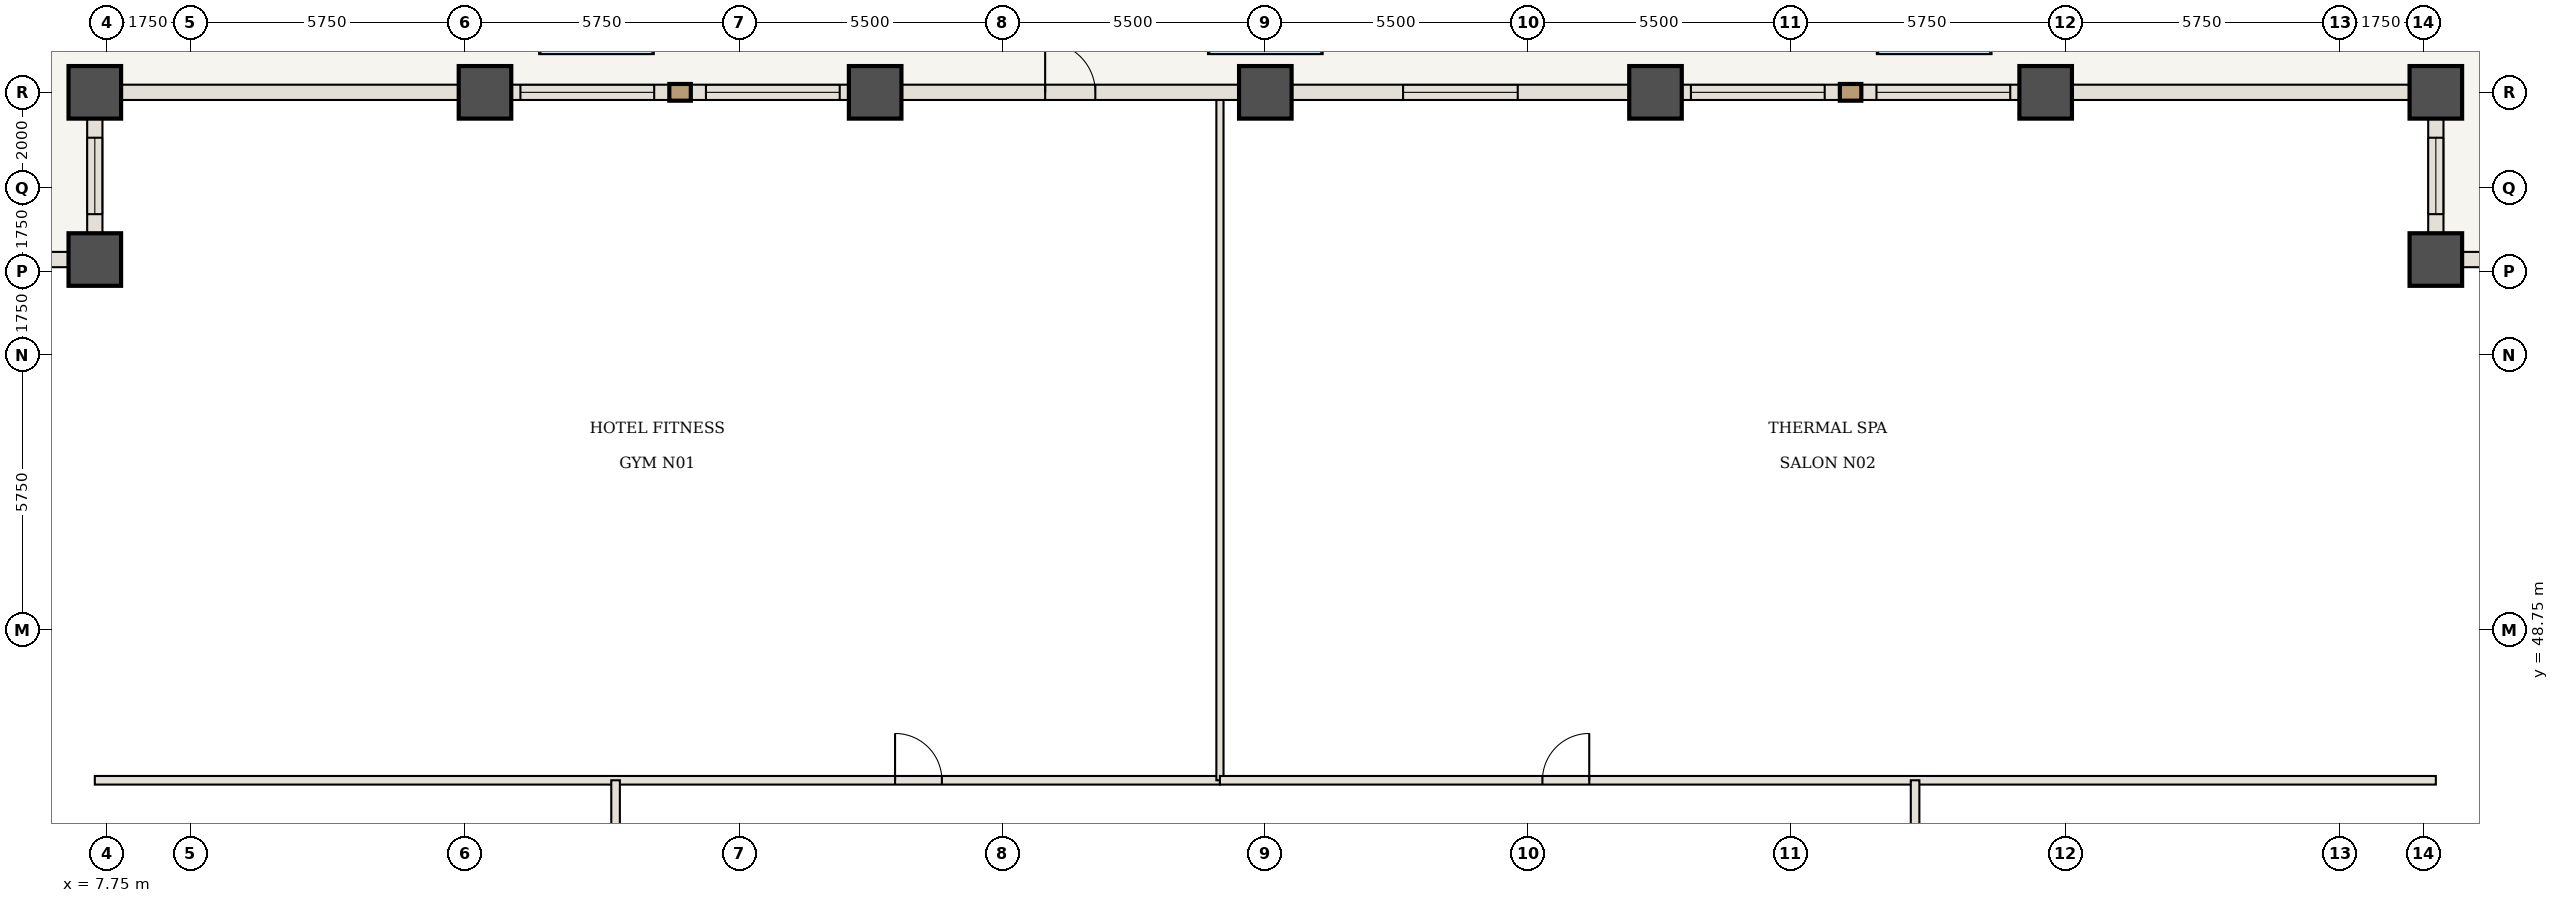
"""IFC4 building model, lengths in metres.
Left out: names, types, materials, properties, quantities, classifications, styles, units other than length and angle.
Written with IfcOpenShell. Run it as: python <this file> out.ifc"""

import sys

from ifc_helpers import new_model, si_unit, direction, frame, frame_2d, origin, origin_2d, place, context, subcontext, project, spatial, rectangle, extrude, element, fill, save


model = new_model("IFC4")
c1 = context("Model", 3, precision=1e-05, world=origin(), true_north=direction((0.0, 1.0)))
c2 = subcontext(c1, "Body", "Model", "MODEL_VIEW")
j1 = project(units=[si_unit("LENGTHUNIT", "METRE"), si_unit("PLANEANGLEUNIT", "RADIAN")], contexts=[c1])
p1 = place(None, origin())
s1 = spatial("IfcSite", under=j1, at=p1, CompositionType="ELEMENT")
p2 = place(p1, origin())
s2 = spatial("IfcBuilding", under=s1, at=p2, CompositionType="ELEMENT")
p3 = place(p2, frame((0.0, 0.0, 34.3)))
s3 = spatial("IfcBuildingStorey", under=s2, at=p3, CompositionType="ELEMENT", Elevation=34.3)
for number, where, z_axis, x_axis in (
    (1, (56.5, 56.5, -0.42), (0.0, 0.0, 1.0), (1.0, 0.0, 0.0)),
    (2, (56.5, 60.0, -0.42), (0.0, 0.0, 1.0), (1.0, 0.0, 0.0)),
    (3, (7.5, 60.0, -0.42), (0.0, 0.0, 1.0), (1.0, 0.0, 0.0)),
    (4, (7.5, 56.5, -0.42), (0.0, 0.0, 1.0), (1.0, 0.0, 0.0)),
    (5, (15.667, 60.0, -0.42), (0.0, 0.0, 1.0), (1.0, 0.0, 0.0)),
    (6, (23.833, 60.0, -0.42), (0.0, 0.0, 1.0), (1.0, 0.0, 0.0)),
    (7, (32.0, 60.0, -0.42), (0.0, 0.0, 1.0), (1.0, 0.0, 0.0)),
    (8, (40.167, 60.0, -0.42), (0.0, 0.0, 1.0), (1.0, 0.0, 0.0)),
    (9, (48.333, 60.0, -0.42), (0.0, 0.0, 1.0), (1.0, 0.0, 0.0)),
):
    element("IfcColumn", number, at=place(p3, frame(where, z_axis=z_axis, x_axis=x_axis)), inside=s3, PredefinedType="COLUMN", context=c2, shape_type="SweptSolid", body=[
        extrude(rectangle(XDim=1.1, YDim=1.1, at=origin_2d()), origin(), (0.0, 0.0, 1.0), 4.97),
    ])
p4 = place(p3, frame((7.5, 45.6, 0.0), z_axis=(0.0, 0.0, 1.0), x_axis=(1.0, 0.0, 0.0)))
e10 = element("IfcWall", 10, at=p4, inside=s3, PredefinedType="STANDARD", context=c2, shape_type="SweptSolid", body=[
    extrude(rectangle(XDim=23.55, YDim=0.18, at=frame_2d((11.775, 0.0))), origin(), (0.0, 0.0, 1.0), 4.13),
])
p5 = place(p4, frame((16.75, 0.0, 0.0)))
e11 = element("IfcOpeningElement", 11, at=p5, cuts=e10, PredefinedType="OPENING", context=c2, shape_type="SweptSolid", body=[
    extrude(rectangle(XDim=0.98, YDim=2.2, at=frame_2d((0.49, 1.1))), frame((0.0, 0.1, 0.0), z_axis=(0.0, -1.0, 0.0), x_axis=(1.0, 0.0, 0.0)), (0.0, 0.0, 1.0), 0.2),
])
p6 = place(p3, frame((31.05, 45.6, 0.0), z_axis=(0.0, 0.0, 1.0), x_axis=(0.0, 1.0, 0.0)))
e12 = element("IfcWall", 12, at=p6, inside=s3, PredefinedType="STANDARD", context=c2, shape_type="SweptSolid", body=[
    extrude(rectangle(XDim=14.34, YDim=0.15, at=frame_2d((7.17, 0.0))), origin(), (0.0, 0.0, 1.0), 4.13),
])
p7 = place(p3, frame((31.05, 45.6, 0.0), z_axis=(0.0, 0.0, 1.0), x_axis=(1.0, 0.0, 0.0)))
e13 = element("IfcWall", 13, at=p7, inside=s3, PredefinedType="STANDARD", context=c2, shape_type="SweptSolid", body=[
    extrude(rectangle(XDim=25.45, YDim=0.18, at=frame_2d((12.725, 0.0))), origin(), (0.0, 0.0, 1.0), 4.13),
])
p8 = place(p7, frame((6.75, 0.0, 0.0)))
e14 = element("IfcOpeningElement", 14, at=p8, cuts=e13, PredefinedType="OPENING", context=c2, shape_type="SweptSolid", body=[
    extrude(rectangle(XDim=0.98, YDim=2.2, at=frame_2d((0.49, 1.1))), frame((0.0, 0.1, 0.0), z_axis=(0.0, -1.0, 0.0), x_axis=(1.0, 0.0, 0.0)), (0.0, 0.0, 1.0), 0.2),
])
p9 = place(p3, frame((18.4, 31.05, 0.0), z_axis=(0.0, 0.0, 1.0), x_axis=(0.0, 1.0, 0.0)))
e15 = element("IfcWall", 15, at=p9, inside=s3, PredefinedType="STANDARD", context=c2, shape_type="SweptSolid", body=[
    extrude(rectangle(XDim=14.55, YDim=0.18, at=frame_2d((7.275, 0.0))), origin(), (0.0, 0.0, 1.0), 4.13),
])
p10 = place(p9, frame((6.775, 0.0, 0.0)))
e16 = element("IfcOpeningElement", 16, at=p10, cuts=e15, PredefinedType="OPENING", context=c2, shape_type="SweptSolid", body=[
    extrude(rectangle(XDim=0.98, YDim=2.2, at=frame_2d((0.49, 1.1))), frame((0.0, 0.1, 0.0), z_axis=(0.0, -1.0, 0.0), x_axis=(1.0, 0.0, 0.0)), (0.0, 0.0, 1.0), 0.2),
])
p11 = place(p3, frame((45.6, 31.05, 0.0), z_axis=(0.0, 0.0, 1.0), x_axis=(0.0, 1.0, 0.0)))
e17 = element("IfcWall", 17, at=p11, inside=s3, PredefinedType="STANDARD", context=c2, shape_type="SweptSolid", body=[
    extrude(rectangle(XDim=14.55, YDim=0.18, at=frame_2d((7.275, 0.0))), origin(), (0.0, 0.0, 1.0), 4.13),
])
p12 = place(p11, frame((6.775, 0.0, 0.0)))
e18 = element("IfcOpeningElement", 18, at=p12, cuts=e17, PredefinedType="OPENING", context=c2, shape_type="SweptSolid", body=[
    extrude(rectangle(XDim=0.98, YDim=2.2, at=frame_2d((0.49, 1.1))), frame((0.0, 0.1, 0.0), z_axis=(0.0, -1.0, 0.0), x_axis=(1.0, 0.0, 0.0)), (0.0, 0.0, 1.0), 0.2),
])
p13 = place(p3, frame((7.5, 60.0, 0.0), z_axis=(0.0, 0.0, 1.0), x_axis=(1.0, 0.0, 0.0)))
e19 = element("IfcWall", 19, at=p13, inside=s3, PredefinedType="USERDEFINED", context=c2, shape_type="SweptSolid", body=[
    extrude(rectangle(XDim=8.167, YDim=0.32, at=frame_2d((4.083, 0.0))), origin(), (0.0, 0.0, 1.0), 3.33),
])
p14 = place(p3, frame((15.667, 60.0, 0.0), z_axis=(0.0, 0.0, 1.0), x_axis=(1.0, 0.0, 0.0)))
e20 = element("IfcWall", 20, at=p14, inside=s3, PredefinedType="USERDEFINED", context=c2, shape_type="SweptSolid", body=[
    extrude(rectangle(XDim=8.167, YDim=0.32, at=frame_2d((4.083, 0.0))), origin(), (0.0, 0.0, 1.0), 3.33),
])
p15 = place(p14, frame((0.742, 0.0, 0.85)))
e21 = element("IfcOpeningElement", 21, at=p15, cuts=e20, PredefinedType="OPENING", context=c2, shape_type="SweptSolid", body=[
    extrude(rectangle(XDim=2.8, YDim=2.05, at=frame_2d((1.4, 1.025))), frame((0.0, 0.17, 0.0), z_axis=(0.0, -1.0, 0.0), x_axis=(1.0, 0.0, 0.0)), (0.0, 0.0, 1.0), 0.34),
])
p16 = place(p14, frame((4.625, 0.0, 0.85)))
e22 = element("IfcOpeningElement", 22, at=p16, cuts=e20, PredefinedType="OPENING", context=c2, shape_type="SweptSolid", body=[
    extrude(rectangle(XDim=2.8, YDim=2.05, at=frame_2d((1.4, 1.025))), frame((0.0, 0.17, 0.0), z_axis=(0.0, -1.0, 0.0), x_axis=(1.0, 0.0, 0.0)), (0.0, 0.0, 1.0), 0.34),
])
p17 = place(p3, frame((23.833, 60.0, 0.0), z_axis=(0.0, 0.0, 1.0), x_axis=(1.0, 0.0, 0.0)))
e23 = element("IfcWall", 23, at=p17, inside=s3, PredefinedType="USERDEFINED", context=c2, shape_type="SweptSolid", body=[
    extrude(rectangle(XDim=8.167, YDim=0.32, at=frame_2d((4.083, 0.0))), origin(), (0.0, 0.0, 1.0), 3.33),
])
p18 = place(p17, frame((3.558, 0.0, 0.0)))
e24 = element("IfcOpeningElement", 24, at=p18, cuts=e23, PredefinedType="OPENING", context=c2, shape_type="SweptSolid", body=[
    extrude(rectangle(XDim=1.05, YDim=2.2, at=frame_2d((0.525, 1.1))), frame((0.0, 0.17, 0.0), z_axis=(0.0, -1.0, 0.0), x_axis=(1.0, 0.0, 0.0)), (0.0, 0.0, 1.0), 0.34),
])
p19 = place(p3, frame((32.0, 60.0, 0.0), z_axis=(0.0, 0.0, 1.0), x_axis=(1.0, 0.0, 0.0)))
e25 = element("IfcWall", 25, at=p19, inside=s3, PredefinedType="USERDEFINED", context=c2, shape_type="SweptSolid", body=[
    extrude(rectangle(XDim=8.167, YDim=0.32, at=frame_2d((4.083, 0.0))), origin(), (0.0, 0.0, 1.0), 3.33),
])
p20 = place(p19, frame((2.883, 0.0, 0.85)))
e26 = element("IfcOpeningElement", 26, at=p20, cuts=e25, PredefinedType="OPENING", context=c2, shape_type="SweptSolid", body=[
    extrude(rectangle(XDim=2.4, YDim=1.95, at=frame_2d((1.2, 0.975))), frame((0.0, 0.17, 0.0), z_axis=(0.0, -1.0, 0.0), x_axis=(1.0, 0.0, 0.0)), (0.0, 0.0, 1.0), 0.34),
])
p21 = place(p3, frame((40.167, 60.0, 0.0), z_axis=(0.0, 0.0, 1.0), x_axis=(1.0, 0.0, 0.0)))
e27 = element("IfcWall", 27, at=p21, inside=s3, PredefinedType="USERDEFINED", context=c2, shape_type="SweptSolid", body=[
    extrude(rectangle(XDim=8.167, YDim=0.32, at=frame_2d((4.083, 0.0))), origin(), (0.0, 0.0, 1.0), 3.33),
])
p22 = place(p21, frame((0.742, 0.0, 0.85)))
e28 = element("IfcOpeningElement", 28, at=p22, cuts=e27, PredefinedType="OPENING", context=c2, shape_type="SweptSolid", body=[
    extrude(rectangle(XDim=2.8, YDim=2.05, at=frame_2d((1.4, 1.025))), frame((0.0, 0.17, 0.0), z_axis=(0.0, -1.0, 0.0), x_axis=(1.0, 0.0, 0.0)), (0.0, 0.0, 1.0), 0.34),
])
p23 = place(p21, frame((4.625, 0.0, 0.85)))
e29 = element("IfcOpeningElement", 29, at=p23, cuts=e27, PredefinedType="OPENING", context=c2, shape_type="SweptSolid", body=[
    extrude(rectangle(XDim=2.8, YDim=2.05, at=frame_2d((1.4, 1.025))), frame((0.0, 0.17, 0.0), z_axis=(0.0, -1.0, 0.0), x_axis=(1.0, 0.0, 0.0)), (0.0, 0.0, 1.0), 0.34),
])
p24 = place(p3, frame((48.333, 60.0, 0.0), z_axis=(0.0, 0.0, 1.0), x_axis=(1.0, 0.0, 0.0)))
e30 = element("IfcWall", 30, at=p24, inside=s3, PredefinedType="USERDEFINED", context=c2, shape_type="SweptSolid", body=[
    extrude(rectangle(XDim=8.167, YDim=0.32, at=frame_2d((4.083, 0.0))), origin(), (0.0, 0.0, 1.0), 3.33),
])
p25 = place(p3, frame((56.5, 56.5, 0.0), z_axis=(0.0, 0.0, 1.0), x_axis=(1.0, 0.0, 0.0)))
e31 = element("IfcWall", 31, at=p25, inside=s3, PredefinedType="USERDEFINED", context=c2, shape_type="SweptSolid", body=[
    extrude(rectangle(XDim=3.5, YDim=0.32, at=frame_2d((1.75, 0.0))), origin(), (0.0, 0.0, 1.0), 3.33),
])
p26 = place(p25, frame((0.95, 0.0, 0.85)))
e32 = element("IfcOpeningElement", 32, at=p26, cuts=e31, PredefinedType="OPENING", context=c2, shape_type="SweptSolid", body=[
    extrude(rectangle(XDim=1.6, YDim=2.05, at=frame_2d((0.8, 1.025))), frame((0.0, 0.17, 0.0), z_axis=(0.0, -1.0, 0.0), x_axis=(1.0, 0.0, 0.0)), (0.0, 0.0, 1.0), 0.34),
])
p27 = place(p3, frame((56.5, 60.0, 0.0), z_axis=(0.0, 0.0, 1.0), x_axis=(0.0, -1.0, 0.0)))
e33 = element("IfcWall", 33, at=p27, inside=s3, PredefinedType="USERDEFINED", context=c2, shape_type="SweptSolid", body=[
    extrude(rectangle(XDim=3.5, YDim=0.32, at=frame_2d((1.75, 0.0))), origin(), (0.0, 0.0, 1.0), 3.33),
])
p28 = place(p27, frame((0.95, 0.0, 0.85)))
e34 = element("IfcOpeningElement", 34, at=p28, cuts=e33, PredefinedType="OPENING", context=c2, shape_type="SweptSolid", body=[
    extrude(rectangle(XDim=1.6, YDim=2.05, at=frame_2d((0.8, 1.025))), frame((0.0, 0.17, 0.0), z_axis=(0.0, -1.0, 0.0), x_axis=(1.0, 0.0, 0.0)), (0.0, 0.0, 1.0), 0.34),
])
p29 = place(p3, frame((7.5, 56.5, 0.0), z_axis=(0.0, 0.0, 1.0), x_axis=(0.0, 1.0, 0.0)))
e35 = element("IfcWall", 35, at=p29, inside=s3, PredefinedType="USERDEFINED", context=c2, shape_type="SweptSolid", body=[
    extrude(rectangle(XDim=3.5, YDim=0.32, at=frame_2d((1.75, 0.0))), origin(), (0.0, 0.0, 1.0), 3.33),
])
p30 = place(p29, frame((0.95, 0.0, 0.85)))
e36 = element("IfcOpeningElement", 36, at=p30, cuts=e35, PredefinedType="OPENING", context=c2, shape_type="SweptSolid", body=[
    extrude(rectangle(XDim=1.6, YDim=2.05, at=frame_2d((0.8, 1.025))), frame((0.0, 0.17, 0.0), z_axis=(0.0, -1.0, 0.0), x_axis=(1.0, 0.0, 0.0)), (0.0, 0.0, 1.0), 0.34),
])
p31 = place(p3, frame((4.0, 56.5, 0.0), z_axis=(0.0, 0.0, 1.0), x_axis=(1.0, 0.0, 0.0)))
e37 = element("IfcWall", 37, at=p31, inside=s3, PredefinedType="USERDEFINED", context=c2, shape_type="SweptSolid", body=[
    extrude(rectangle(XDim=3.5, YDim=0.32, at=frame_2d((1.75, 0.0))), origin(), (0.0, 0.0, 1.0), 3.33),
])
p32 = place(p31, frame((0.95, 0.0, 0.85)))
e38 = element("IfcOpeningElement", 38, at=p32, cuts=e37, PredefinedType="OPENING", context=c2, shape_type="SweptSolid", body=[
    extrude(rectangle(XDim=1.6, YDim=2.05, at=frame_2d((0.8, 1.025))), frame((0.0, 0.17, 0.0), z_axis=(0.0, -1.0, 0.0), x_axis=(1.0, 0.0, 0.0)), (0.0, 0.0, 1.0), 0.34),
])
p33 = place(p5, origin())
e39 = element("IfcDoor", 39, at=p33, inside=s3, OperationType="SINGLE_SWING_LEFT", PredefinedType="DOOR", context=c2, shape_type="SweptSolid", body=[
    extrude(rectangle(XDim=0.98, YDim=2.2, at=frame_2d((0.49, 1.1))), frame((0.0, 0.025, 0.0), z_axis=(0.0, -1.0, 0.0), x_axis=(1.0, 0.0, 0.0)), (0.0, 0.0, 1.0), 0.05),
])
fill(e11, e39)
p34 = place(p8, origin())
e40 = element("IfcDoor", 40, at=p34, inside=s3, OperationType="SINGLE_SWING_RIGHT", PredefinedType="DOOR", context=c2, shape_type="SweptSolid", body=[
    extrude(rectangle(XDim=0.98, YDim=2.2, at=frame_2d((0.49, 1.1))), frame((0.0, 0.025, 0.0), z_axis=(0.0, -1.0, 0.0), x_axis=(1.0, 0.0, 0.0)), (0.0, 0.0, 1.0), 0.05),
])
fill(e14, e40)
p35 = place(p3, frame((0.0, 0.0, -0.25)))
p36 = place(p35, frame((18.0, 62.0, 0.0)))
p37 = place(p36, frame((0.0, 0.0, 0.2)))
e41 = element("IfcWindow", 41, at=p37, inside=s3, PartitioningType="SINGLE_PANEL", PredefinedType="SKYLIGHT", context=c2, shape_type="SweptSolid", body=[
    extrude(rectangle(XDim=2.4, YDim=2.4, at=origin_2d()), origin(), (0.0, 0.0, 1.0), 0.05),
])
p38 = place(p35, frame((32.0, 62.0, 0.0)))
p39 = place(p38, frame((0.0, 0.0, 0.2)))
e42 = element("IfcWindow", 42, at=p39, inside=s3, PartitioningType="SINGLE_PANEL", PredefinedType="SKYLIGHT", context=c2, shape_type="SweptSolid", body=[
    extrude(rectangle(XDim=2.4, YDim=2.4, at=origin_2d()), origin(), (0.0, 0.0, 1.0), 0.05),
])
p40 = place(p35, frame((46.0, 62.0, 0.0)))
p41 = place(p40, frame((0.0, 0.0, 0.2)))
e43 = element("IfcWindow", 43, at=p41, inside=s3, PartitioningType="SINGLE_PANEL", PredefinedType="SKYLIGHT", context=c2, shape_type="SweptSolid", body=[
    extrude(rectangle(XDim=2.4, YDim=2.4, at=origin_2d()), origin(), (0.0, 0.0, 1.0), 0.05),
])
p42 = place(p15, origin())
e44 = element("IfcWindow", 44, at=p42, inside=s3, PartitioningType="SINGLE_PANEL", PredefinedType="WINDOW", context=c2, shape_type="SweptSolid", body=[
    extrude(rectangle(XDim=2.8, YDim=2.05, at=frame_2d((1.4, 1.025))), frame((0.0, 0.03, 0.0), z_axis=(0.0, -1.0, 0.0), x_axis=(1.0, 0.0, 0.0)), (0.0, 0.0, 1.0), 0.06),
])
fill(e21, e44)
p43 = place(p16, origin())
e45 = element("IfcWindow", 45, at=p43, inside=s3, PartitioningType="SINGLE_PANEL", PredefinedType="WINDOW", context=c2, shape_type="SweptSolid", body=[
    extrude(rectangle(XDim=2.8, YDim=2.05, at=frame_2d((1.4, 1.025))), frame((0.0, 0.03, 0.0), z_axis=(0.0, -1.0, 0.0), x_axis=(1.0, 0.0, 0.0)), (0.0, 0.0, 1.0), 0.06),
])
fill(e22, e45)
p44 = place(p18, origin())
e46 = element("IfcDoor", 46, at=p44, inside=s3, OperationType="SINGLE_SWING_LEFT", PredefinedType="DOOR", context=c2, shape_type="SweptSolid", body=[
    extrude(rectangle(XDim=1.05, YDim=2.2, at=frame_2d((0.525, 1.1))), frame((0.0, 0.025, 0.0), z_axis=(0.0, -1.0, 0.0), x_axis=(1.0, 0.0, 0.0)), (0.0, 0.0, 1.0), 0.05),
])
fill(e24, e46)
p45 = place(p20, origin())
e47 = element("IfcWindow", 47, at=p45, inside=s3, PartitioningType="SINGLE_PANEL", PredefinedType="WINDOW", context=c2, shape_type="SweptSolid", body=[
    extrude(rectangle(XDim=2.4, YDim=1.95, at=frame_2d((1.2, 0.975))), frame((0.0, 0.03, 0.0), z_axis=(0.0, -1.0, 0.0), x_axis=(1.0, 0.0, 0.0)), (0.0, 0.0, 1.0), 0.06),
])
fill(e26, e47)
p46 = place(p22, origin())
e48 = element("IfcWindow", 48, at=p46, inside=s3, PartitioningType="SINGLE_PANEL", PredefinedType="WINDOW", context=c2, shape_type="SweptSolid", body=[
    extrude(rectangle(XDim=2.8, YDim=2.05, at=frame_2d((1.4, 1.025))), frame((0.0, 0.03, 0.0), z_axis=(0.0, -1.0, 0.0), x_axis=(1.0, 0.0, 0.0)), (0.0, 0.0, 1.0), 0.06),
])
fill(e28, e48)
p47 = place(p23, origin())
e49 = element("IfcWindow", 49, at=p47, inside=s3, PartitioningType="SINGLE_PANEL", PredefinedType="WINDOW", context=c2, shape_type="SweptSolid", body=[
    extrude(rectangle(XDim=2.8, YDim=2.05, at=frame_2d((1.4, 1.025))), frame((0.0, 0.03, 0.0), z_axis=(0.0, -1.0, 0.0), x_axis=(1.0, 0.0, 0.0)), (0.0, 0.0, 1.0), 0.06),
])
fill(e29, e49)
p48 = place(p28, origin())
e50 = element("IfcWindow", 50, at=p48, inside=s3, PartitioningType="SINGLE_PANEL", PredefinedType="WINDOW", context=c2, shape_type="SweptSolid", body=[
    extrude(rectangle(XDim=1.6, YDim=2.05, at=frame_2d((0.8, 1.025))), frame((0.0, 0.03, 0.0), z_axis=(0.0, -1.0, 0.0), x_axis=(1.0, 0.0, 0.0)), (0.0, 0.0, 1.0), 0.06),
])
fill(e34, e50)
p49 = place(p30, origin())
e51 = element("IfcWindow", 51, at=p49, inside=s3, PartitioningType="SINGLE_PANEL", PredefinedType="WINDOW", context=c2, shape_type="SweptSolid", body=[
    extrude(rectangle(XDim=1.6, YDim=2.05, at=frame_2d((0.8, 1.025))), frame((0.0, 0.03, 0.0), z_axis=(0.0, -1.0, 0.0), x_axis=(1.0, 0.0, 0.0)), (0.0, 0.0, 1.0), 0.06),
])
fill(e36, e51)
save(model, sys.argv[1])
